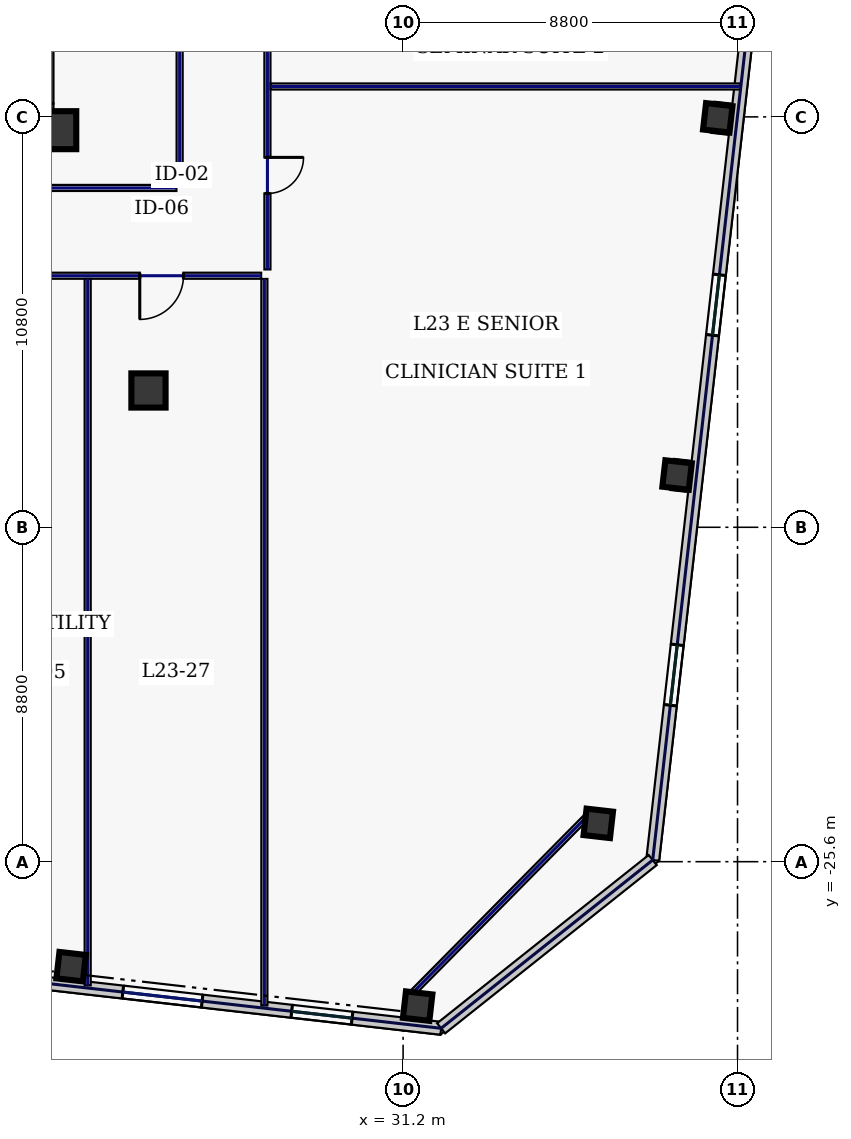
"""IFC4 building model, lengths in metres.
Left out: names, types, materials, properties, quantities, classifications, styles, units other than length and angle.
Written with IfcOpenShell. Run it as: python <this file> out.ifc"""

import sys

from ifc_helpers import new_model, si_unit, direction, frame, frame_2d, origin, origin_2d, place, context, subcontext, project, spatial, rectangle, hollow_rectangle, extrude, element, fill, save


model = new_model("IFC4")
c1 = context("Model", 3, precision=1e-05, world=origin(), true_north=direction((0.0, 1.0)))
c2 = subcontext(c1, "Body", "Model", "MODEL_VIEW")
j1 = project(units=[si_unit("LENGTHUNIT", "METRE"), si_unit("PLANEANGLEUNIT", "RADIAN")], contexts=[c1])
p1 = place(None, origin())
s1 = spatial("IfcSite", under=j1, at=p1, CompositionType="ELEMENT")
p2 = place(p1, origin())
s2 = spatial("IfcBuilding", under=s1, at=p2, CompositionType="ELEMENT")
p3 = place(p2, frame((0.0, 0.0, 105.4)))
s3 = spatial("IfcBuildingStorey", under=s2, at=p3, CompositionType="ELEMENT", Elevation=105.4)
p4 = place(p3, frame((10.45, -6.0, 0.0), z_axis=(0.0, 0.0, 1.0), x_axis=(1.0, 0.0, 0.0)))
e1 = element("IfcWall", 1, at=p4, inside=s3, PredefinedType="SHEAR", context=c2, shape_type="SweptSolid", body=[
    extrude(rectangle(XDim=11.55, YDim=0.7, at=frame_2d((5.775, 0.0))), origin(), (0.0, 0.0, 1.0), 3.74),
])
p5 = place(p3, frame((21.6, -5.65, 0.0), z_axis=(0.0, 0.0, 1.0), x_axis=(0.0, 1.0, 0.0)))
e2 = element("IfcWall", 2, at=p5, inside=s3, PredefinedType="SHEAR", context=c2, shape_type="SweptSolid", body=[
    extrude(rectangle(XDim=11.3, YDim=0.8, at=frame_2d((5.65, 0.0))), origin(), (0.0, 0.0, 1.0), 3.74),
])
p6 = place(p3, frame((22.1, -6.35, 0.0), z_axis=(0.0, 0.0, 1.0), x_axis=(1.0, 0.0, 0.0)))
e3 = element("IfcColumn", 3, at=p6, inside=s3, PredefinedType="COLUMN", context=c2, shape_type="SweptSolid", body=[
    extrude(hollow_rectangle(XDim=1.0, YDim=1.0, WallThickness=0.045, at=origin_2d()), origin(), (0.0, 0.0, 1.0), 3.74),
])
p7 = place(p3, frame((24.5, -13.2, 0.0), z_axis=(0.0, 0.0, 1.0), x_axis=(1.0, 0.0, 0.0)))
e4 = element("IfcColumn", 4, at=p7, inside=s3, PredefinedType="COLUMN", context=c2, shape_type="SweptSolid", body=[
    extrude(hollow_rectangle(XDim=0.9, YDim=0.9, WallThickness=0.04, at=origin_2d()), origin(), (0.0, 0.0, 1.0), 3.74),
])
for number, where, z_axis, x_axis in (
    (5, (22.465, -28.362, 0.0), (0.0, 0.0, 1.0), (0.994, -0.113, 0.0)),
    (6, (31.583, -29.401, 0.0), (0.0, 0.0, 1.0), (0.994, -0.113, 0.0)),
    (7, (36.336, -24.592, 0.0), (0.0, 0.0, 1.0), (0.994, -0.113, 0.0)),
    (8, (38.409, -15.424, 0.0), (0.0, 0.0, 1.0), (0.994, -0.113, 0.0)),
    (9, (39.48, -6.025, 0.0), (0.0, 0.0, 1.0), (0.994, -0.113, 0.0)),
):
    element("IfcColumn", number, at=place(p3, frame(where, z_axis=z_axis, x_axis=x_axis)), inside=s3, PredefinedType="COLUMN", context=c2, shape_type="SweptSolid", body=[
        extrude(hollow_rectangle(XDim=0.7, YDim=0.7, WallThickness=0.032, at=origin_2d()), origin(), (0.0, 0.0, 1.0), 3.74),
    ])
p8 = place(p3, frame((11.115, -27.582, 0.0), z_axis=(0.0, 0.0, 1.0), x_axis=(0.993572655904, -0.113196190044, 0.0)))
e10 = element("IfcWall", 10, at=p8, inside=s3, PredefinedType="STANDARD", context=c2, shape_type="SweptSolid", body=[
    extrude(rectangle(XDim=21.223, YDim=0.34, at=frame_2d((10.611, 0.0))), origin(), (0.0, 0.0, 1.0), 3.74),
])
p9 = place(p8, frame((3.616, 0.0, 0.67)))
e11 = element("IfcOpeningElement", 11, at=p9, cuts=e10, PredefinedType="OPENING", context=c2, shape_type="SweptSolid", body=[
    extrude(rectangle(XDim=0.85, YDim=1.85, at=frame_2d((0.425, 0.925))), frame((0.0, 0.18, 0.0), z_axis=(0.0, -1.0, 0.0), x_axis=(1.0, 0.0, 0.0)), (0.0, 0.0, 1.0), 0.36),
])
p10 = place(p8, frame((7.838, 0.0, 0.67)))
e12 = element("IfcOpeningElement", 12, at=p10, cuts=e10, PredefinedType="OPENING", context=c2, shape_type="SweptSolid", body=[
    extrude(rectangle(XDim=2.1, YDim=2.2, at=frame_2d((1.05, 1.1))), frame((0.0, 0.18, 0.0), z_axis=(0.0, -1.0, 0.0), x_axis=(1.0, 0.0, 0.0)), (0.0, 0.0, 1.0), 0.36),
])
p11 = place(p8, frame((12.794, 0.0, 0.67)))
e13 = element("IfcOpeningElement", 13, at=p11, cuts=e10, PredefinedType="OPENING", context=c2, shape_type="SweptSolid", body=[
    extrude(rectangle(XDim=2.1, YDim=2.2, at=frame_2d((1.05, 1.1))), frame((0.0, 0.18, 0.0), z_axis=(0.0, -1.0, 0.0), x_axis=(1.0, 0.0, 0.0)), (0.0, 0.0, 1.0), 0.36),
])
p12 = place(p8, frame((17.265, 0.0, 0.22)))
e14 = element("IfcOpeningElement", 14, at=p12, cuts=e10, PredefinedType="OPENING", context=c2, shape_type="SweptSolid", body=[
    extrude(rectangle(XDim=1.6, YDim=1.2, at=frame_2d((0.8, 0.6))), frame((0.0, 0.18, 0.0), z_axis=(0.0, -1.0, 0.0), x_axis=(1.0, 0.0, 0.0)), (0.0, 0.0, 1.0), 0.36),
])
p13 = place(p3, frame((37.768, -25.556, 0.0), z_axis=(0.0, 0.0, 1.0), x_axis=(0.113201605824, 0.993572038877, 0.0)))
e15 = element("IfcWall", 15, at=p13, inside=s3, PredefinedType="STANDARD", context=c2, shape_type="SweptSolid", body=[
    extrude(rectangle(XDim=39.2, YDim=0.34, at=frame_2d((19.6, 0.0))), origin(), (0.0, 0.0, 1.0), 3.74),
])
p14 = place(p13, frame((4.1, 0.0, 0.58)))
e16 = element("IfcOpeningElement", 16, at=p14, cuts=e15, PredefinedType="OPENING", context=c2, shape_type="SweptSolid", body=[
    extrude(rectangle(XDim=1.6, YDim=2.3, at=frame_2d((0.8, 1.15))), frame((0.0, 0.18, 0.0), z_axis=(0.0, -1.0, 0.0), x_axis=(1.0, 0.0, 0.0)), (0.0, 0.0, 1.0), 0.36),
])
p15 = place(p13, frame((13.9, 0.0, 0.58)))
e17 = element("IfcOpeningElement", 17, at=p15, cuts=e15, PredefinedType="OPENING", context=c2, shape_type="SweptSolid", body=[
    extrude(rectangle(XDim=1.6, YDim=2.3, at=frame_2d((0.8, 1.15))), frame((0.0, 0.18, 0.0), z_axis=(0.0, -1.0, 0.0), x_axis=(1.0, 0.0, 0.0)), (0.0, 0.0, 1.0), 0.36),
])
p16 = place(p13, frame((33.5, 0.0, 0.58)))
e18 = element("IfcOpeningElement", 18, at=p16, cuts=e15, PredefinedType="OPENING", context=c2, shape_type="SweptSolid", body=[
    extrude(rectangle(XDim=1.6, YDim=2.3, at=frame_2d((0.8, 1.15))), frame((0.0, 0.18, 0.0), z_axis=(0.0, -1.0, 0.0), x_axis=(1.0, 0.0, 0.0)), (0.0, 0.0, 1.0), 0.36),
])
p17 = place(p3, frame((32.201, -29.985, 0.0), z_axis=(0.0, 0.0, 1.0), x_axis=(0.78261359446, 0.622507800567, 0.0)))
e19 = element("IfcWall", 19, at=p17, inside=s3, PredefinedType="STANDARD", context=c2, shape_type="SweptSolid", body=[
    extrude(rectangle(XDim=7.114, YDim=0.34, at=frame_2d((3.557, 0.0))), origin(), (0.0, 0.0, 1.0), 3.74),
])
p18 = place(p3, frame((31.341, -29.162, 0.0), z_axis=(0.0, 0.0, 1.0), x_axis=(0.702905898933, 0.711282853192, 0.0)))
e20 = element("IfcWall", 20, at=p18, inside=s3, PredefinedType="PARTITIONING", context=c2, shape_type="SweptSolid", body=[
    extrude(rectangle(XDim=6.761, YDim=0.16, at=frame_2d((3.381, 0.0))), origin(), (0.0, 0.0, 1.0), 3.74),
])
p19 = place(p3, frame((27.63, 10.115, 0.0), z_axis=(0.0, 0.0, 1.0), x_axis=(0.0, -1.0, 0.0)))
e21 = element("IfcWall", 21, at=p19, inside=s3, PredefinedType="PARTITIONING", context=c2, shape_type="SweptSolid", body=[
    extrude(rectangle(XDim=20.13, YDim=0.16, at=frame_2d((10.065, 0.0))), origin(), (0.0, 0.0, 1.0), 3.74),
])
p20 = place(p19, frame((17.181, 0.0, 0.0)))
e22 = element("IfcOpeningElement", 22, at=p20, cuts=e21, PredefinedType="OPENING", context=c2, shape_type="SweptSolid", body=[
    extrude(rectangle(XDim=0.95, YDim=2.2, at=frame_2d((0.475, 1.1))), frame((0.0, 0.09, 0.0), z_axis=(0.0, -1.0, 0.0), x_axis=(1.0, 0.0, 0.0)), (0.0, 0.0, 1.0), 0.18),
])
p21 = place(p19, frame((12.95, 0.0, 0.0)))
e23 = element("IfcOpeningElement", 23, at=p21, cuts=e21, PredefinedType="OPENING", context=c2, shape_type="SweptSolid", body=[
    extrude(rectangle(XDim=0.95, YDim=2.2, at=frame_2d((0.475, 1.1))), frame((0.0, 0.09, 0.0), z_axis=(0.0, -1.0, 0.0), x_axis=(1.0, 0.0, 0.0)), (0.0, 0.0, 1.0), 0.18),
])
p22 = place(p19, frame((7.45, 0.0, 0.0)))
e24 = element("IfcOpeningElement", 24, at=p22, cuts=e21, PredefinedType="OPENING", context=c2, shape_type="SweptSolid", body=[
    extrude(rectangle(XDim=0.95, YDim=2.2, at=frame_2d((0.475, 1.1))), frame((0.0, 0.09, 0.0), z_axis=(0.0, -1.0, 0.0), x_axis=(1.0, 0.0, 0.0)), (0.0, 0.0, 1.0), 0.18),
])
p23 = place(p19, frame((2.219, 0.0, 0.0)))
e25 = element("IfcOpeningElement", 25, at=p23, cuts=e21, PredefinedType="OPENING", context=c2, shape_type="SweptSolid", body=[
    extrude(rectangle(XDim=0.95, YDim=2.2, at=frame_2d((0.475, 1.1))), frame((0.0, 0.09, 0.0), z_axis=(0.0, -1.0, 0.0), x_axis=(1.0, 0.0, 0.0)), (0.0, 0.0, 1.0), 0.18),
])
p24 = place(p3, frame((27.465, -10.18, 0.0), z_axis=(0.0, 0.0, 1.0), x_axis=(-1.0, 0.0, 0.0)))
e26 = element("IfcWall", 26, at=p24, inside=s3, PredefinedType="PARTITIONING", context=c2, shape_type="SweptSolid", body=[
    extrude(rectangle(XDim=54.93, YDim=0.16, at=frame_2d((27.465, 0.0))), origin(), (0.0, 0.0, 1.0), 3.74),
])
p25 = place(p24, frame((52.106, 0.0, 0.0)))
e27 = element("IfcOpeningElement", 27, at=p25, cuts=e26, PredefinedType="OPENING", context=c2, shape_type="SweptSolid", body=[
    extrude(rectangle(XDim=0.95, YDim=2.2, at=frame_2d((0.475, 1.1))), frame((0.0, 0.09, 0.0), z_axis=(0.0, -1.0, 0.0), x_axis=(1.0, 0.0, 0.0)), (0.0, 0.0, 1.0), 0.18),
])
p26 = place(p24, frame((46.575, 0.0, 0.0)))
e28 = element("IfcOpeningElement", 28, at=p26, cuts=e26, PredefinedType="OPENING", context=c2, shape_type="SweptSolid", body=[
    extrude(rectangle(XDim=1.15, YDim=2.2, at=frame_2d((0.575, 1.1))), frame((0.0, 0.09, 0.0), z_axis=(0.0, -1.0, 0.0), x_axis=(1.0, 0.0, 0.0)), (0.0, 0.0, 1.0), 0.18),
])
p27 = place(p24, frame((40.225, 0.0, 0.0)))
e29 = element("IfcOpeningElement", 29, at=p27, cuts=e26, PredefinedType="OPENING", context=c2, shape_type="SweptSolid", body=[
    extrude(rectangle(XDim=0.95, YDim=2.2, at=frame_2d((0.475, 1.1))), frame((0.0, 0.09, 0.0), z_axis=(0.0, -1.0, 0.0), x_axis=(1.0, 0.0, 0.0)), (0.0, 0.0, 1.0), 0.18),
])
p28 = place(p24, frame((33.425, 0.0, 0.0)))
e30 = element("IfcOpeningElement", 30, at=p28, cuts=e26, PredefinedType="OPENING", context=c2, shape_type="SweptSolid", body=[
    extrude(rectangle(XDim=1.3, YDim=2.2, at=frame_2d((0.65, 1.1))), frame((0.0, 0.09, 0.0), z_axis=(0.0, -1.0, 0.0), x_axis=(1.0, 0.0, 0.0)), (0.0, 0.0, 1.0), 0.18),
])
p29 = place(p24, frame((26.525, 0.0, 0.0)))
e31 = element("IfcOpeningElement", 31, at=p29, cuts=e26, PredefinedType="OPENING", context=c2, shape_type="SweptSolid", body=[
    extrude(rectangle(XDim=1.3, YDim=2.2, at=frame_2d((0.65, 1.1))), frame((0.0, 0.09, 0.0), z_axis=(0.0, -1.0, 0.0), x_axis=(1.0, 0.0, 0.0)), (0.0, 0.0, 1.0), 0.18),
])
p30 = place(p24, frame((19.875, 0.0, 0.0)))
e32 = element("IfcOpeningElement", 32, at=p30, cuts=e26, PredefinedType="OPENING", context=c2, shape_type="SweptSolid", body=[
    extrude(rectangle(XDim=1.3, YDim=2.2, at=frame_2d((0.65, 1.1))), frame((0.0, 0.09, 0.0), z_axis=(0.0, -1.0, 0.0), x_axis=(1.0, 0.0, 0.0)), (0.0, 0.0, 1.0), 0.18),
])
p31 = place(p24, frame((13.65, 0.0, 0.0)))
e33 = element("IfcOpeningElement", 33, at=p31, cuts=e26, PredefinedType="OPENING", context=c2, shape_type="SweptSolid", body=[
    extrude(rectangle(XDim=0.95, YDim=2.2, at=frame_2d((0.475, 1.1))), frame((0.0, 0.09, 0.0), z_axis=(0.0, -1.0, 0.0), x_axis=(1.0, 0.0, 0.0)), (0.0, 0.0, 1.0), 0.18),
])
p32 = place(p24, frame((7.425, 0.0, 0.0)))
e34 = element("IfcOpeningElement", 34, at=p32, cuts=e26, PredefinedType="OPENING", context=c2, shape_type="SweptSolid", body=[
    extrude(rectangle(XDim=0.95, YDim=2.2, at=frame_2d((0.475, 1.1))), frame((0.0, 0.09, 0.0), z_axis=(0.0, -1.0, 0.0), x_axis=(1.0, 0.0, 0.0)), (0.0, 0.0, 1.0), 0.18),
])
p33 = place(p24, frame((2.044, 0.0, 0.0)))
e35 = element("IfcOpeningElement", 35, at=p33, cuts=e26, PredefinedType="OPENING", context=c2, shape_type="SweptSolid", body=[
    extrude(rectangle(XDim=1.15, YDim=2.2, at=frame_2d((0.575, 1.1))), frame((0.0, 0.09, 0.0), z_axis=(0.0, -1.0, 0.0), x_axis=(1.0, 0.0, 0.0)), (0.0, 0.0, 1.0), 0.18),
])
p34 = place(p3, frame((10.665, -7.87, 0.0), z_axis=(0.0, 0.0, 1.0), x_axis=(1.0, 0.0, 0.0)))
e36 = element("IfcWall", 36, at=p34, inside=s3, PredefinedType="PARTITIONING", context=c2, shape_type="SweptSolid", body=[
    extrude(rectangle(XDim=14.57, YDim=0.16, at=frame_2d((7.285, 0.0))), origin(), (0.0, 0.0, 1.0), 3.74),
])
p35 = place(p3, frame((25.32, -7.785, 0.0), z_axis=(0.0, 0.0, 1.0), x_axis=(0.0, 1.0, 0.0)))
e37 = element("IfcWall", 37, at=p35, inside=s3, PredefinedType="PARTITIONING", context=c2, shape_type="SweptSolid", body=[
    extrude(rectangle(XDim=15.67, YDim=0.16, at=frame_2d((7.835, 0.0))), origin(), (0.0, 0.0, 1.0), 3.74),
])
p36 = place(p3, frame((27.55, -29.385, 0.0), z_axis=(0.0, 0.0, 1.0), x_axis=(0.0, 1.0, 0.0)))
e38 = element("IfcWall", 38, at=p36, inside=s3, PredefinedType="PARTITIONING", context=c2, shape_type="SweptSolid", body=[
    extrude(rectangle(XDim=19.12, YDim=0.16, at=frame_2d((9.56, 0.0))), origin(), (0.0, 0.0, 1.0), 3.74),
])
p37 = place(p3, frame((22.9, -28.854, 0.0), z_axis=(0.0, 0.0, 1.0), x_axis=(0.0, 1.0, 0.0)))
e39 = element("IfcWall", 39, at=p37, inside=s3, PredefinedType="PARTITIONING", context=c2, shape_type="SweptSolid", body=[
    extrude(rectangle(XDim=18.59, YDim=0.16, at=frame_2d((9.295, 0.0))), origin(), (0.0, 0.0, 1.0), 3.235),
])
p38 = place(p3, frame((27.715, -5.2, 0.0), z_axis=(0.0, 0.0, 1.0), x_axis=(1.0, 0.0, 0.0)))
e40 = element("IfcWall", 40, at=p38, inside=s3, PredefinedType="PARTITIONING", context=c2, shape_type="SweptSolid", body=[
    extrude(rectangle(XDim=12.352, YDim=0.16, at=frame_2d((6.176, 0.0))), origin(), (0.0, 0.0, 1.0), 3.74),
])
p39 = place(p11, origin())
e41 = element("IfcWindow", 41, at=p39, inside=s3, PartitioningType="SINGLE_PANEL", PredefinedType="WINDOW", context=c2, shape_type="SweptSolid", body=[
    extrude(rectangle(XDim=2.1, YDim=2.2, at=frame_2d((1.05, 1.1))), frame((0.0, 0.03, 0.0), z_axis=(0.0, -1.0, 0.0), x_axis=(1.0, 0.0, 0.0)), (0.0, 0.0, 1.0), 0.06),
])
fill(e13, e41)
p40 = place(p12, origin())
e42 = element("IfcWindow", 42, at=p40, inside=s3, PartitioningType="SINGLE_PANEL", PredefinedType="WINDOW", context=c2, shape_type="SweptSolid", body=[
    extrude(rectangle(XDim=1.6, YDim=1.2, at=frame_2d((0.8, 0.6))), frame((0.0, 0.03, 0.0), z_axis=(0.0, -1.0, 0.0), x_axis=(1.0, 0.0, 0.0)), (0.0, 0.0, 1.0), 0.06),
])
fill(e14, e42)
p41 = place(p14, origin())
e43 = element("IfcWindow", 43, at=p41, inside=s3, PartitioningType="SINGLE_PANEL", PredefinedType="WINDOW", context=c2, shape_type="SweptSolid", body=[
    extrude(rectangle(XDim=1.6, YDim=2.3, at=frame_2d((0.8, 1.15))), frame((0.0, 0.03, 0.0), z_axis=(0.0, -1.0, 0.0), x_axis=(1.0, 0.0, 0.0)), (0.0, 0.0, 1.0), 0.06),
])
fill(e16, e43)
p42 = place(p15, origin())
e44 = element("IfcWindow", 44, at=p42, inside=s3, PartitioningType="SINGLE_PANEL", PredefinedType="WINDOW", context=c2, shape_type="SweptSolid", body=[
    extrude(rectangle(XDim=1.6, YDim=2.3, at=frame_2d((0.8, 1.15))), frame((0.0, 0.03, 0.0), z_axis=(0.0, -1.0, 0.0), x_axis=(1.0, 0.0, 0.0)), (0.0, 0.0, 1.0), 0.06),
])
fill(e17, e44)
p43 = place(p33, origin())
e45 = element("IfcDoor", 45, at=p43, inside=s3, OperationType="SINGLE_SWING_RIGHT", PredefinedType="DOOR", context=c2, shape_type="SweptSolid", body=[
    extrude(rectangle(XDim=1.15, YDim=2.2, at=frame_2d((0.575, 1.1))), frame((0.0, 0.025, 0.0), z_axis=(0.0, -1.0, 0.0), x_axis=(1.0, 0.0, 0.0)), (0.0, 0.0, 1.0), 0.05),
])
fill(e35, e45)
p44 = place(p20, origin())
e46 = element("IfcDoor", 46, at=p44, inside=s3, OperationType="SINGLE_SWING_LEFT", PredefinedType="DOOR", context=c2, shape_type="SweptSolid", body=[
    extrude(rectangle(XDim=0.95, YDim=2.2, at=frame_2d((0.475, 1.1))), frame((0.0, 0.025, 0.0), z_axis=(0.0, -1.0, 0.0), x_axis=(1.0, 0.0, 0.0)), (0.0, 0.0, 1.0), 0.05),
])
fill(e22, e46)
save(model, sys.argv[1])
